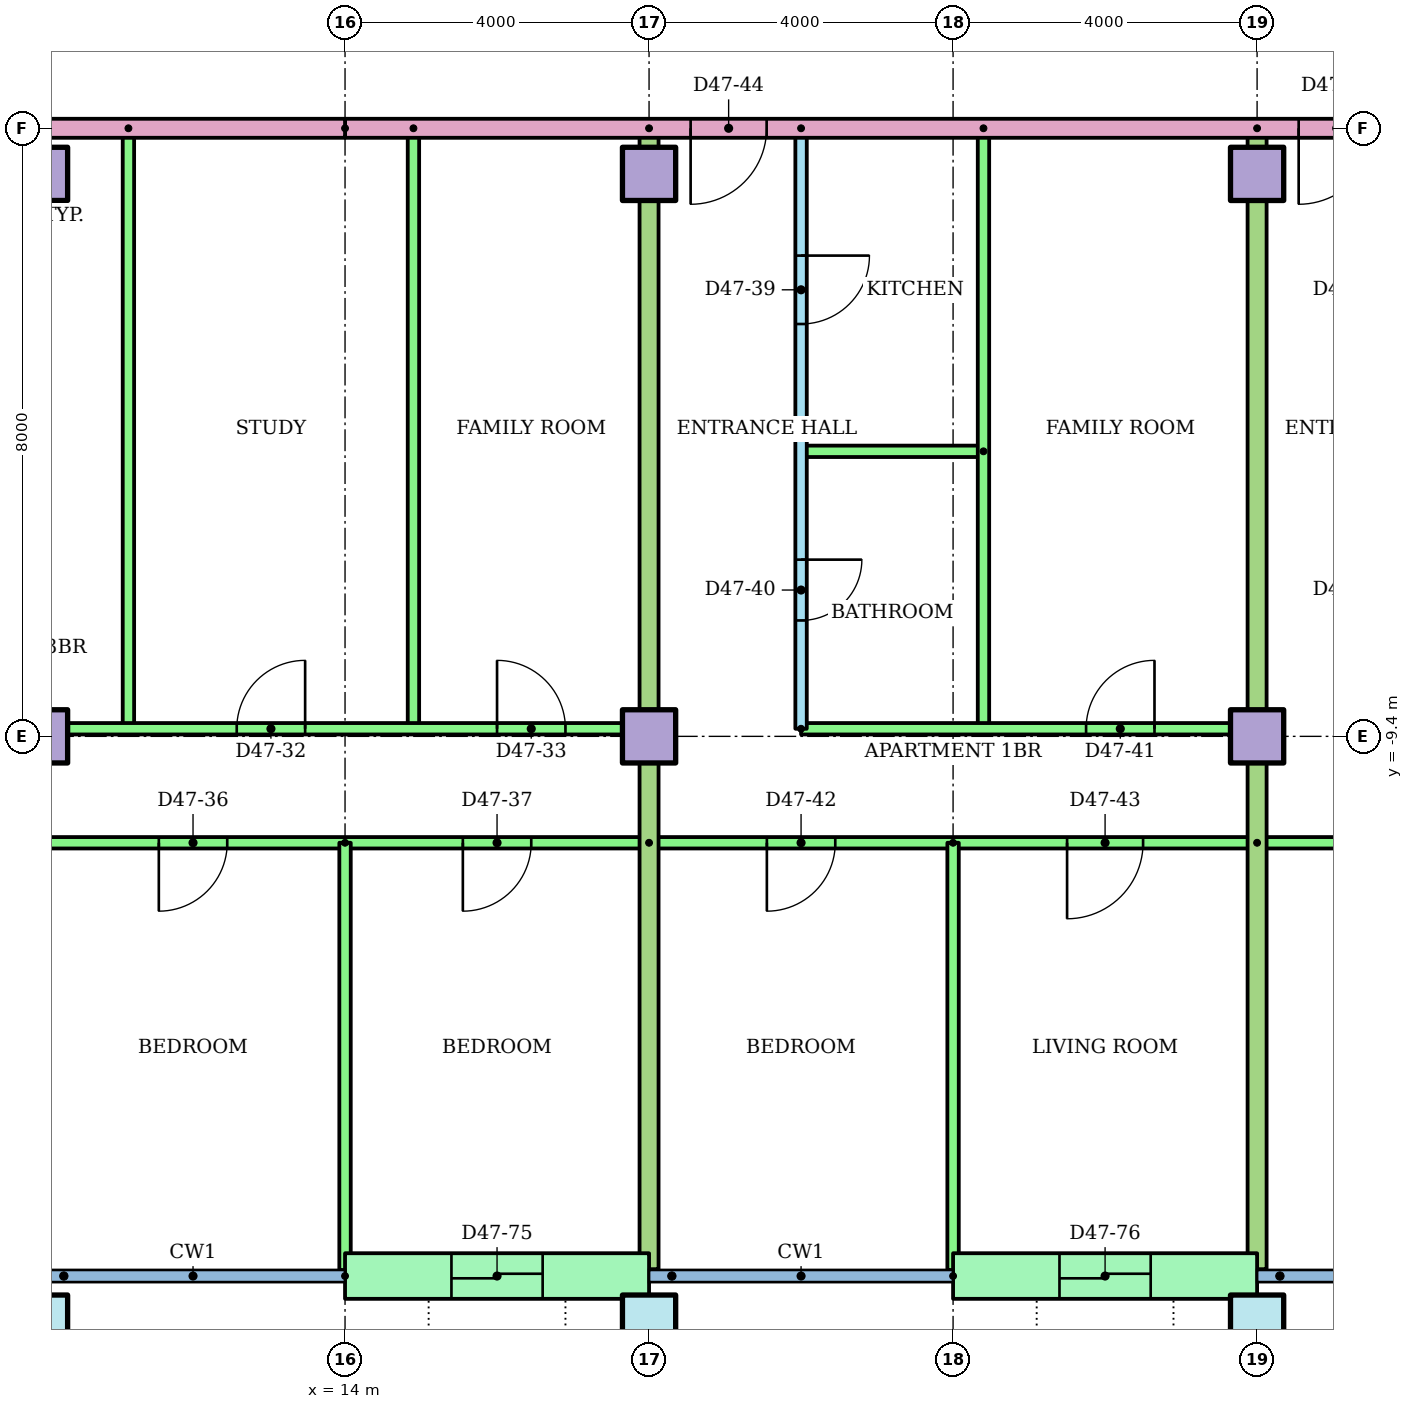
"""IFC4 building model, lengths in metres.
Left out: names, types, materials, properties, quantities, classifications, styles, units other than length and angle.
Written with IfcOpenShell. Run it as: python <this file> out.ifc"""

import sys

from ifc_helpers import new_model, si_unit, direction, frame, frame_2d, origin, origin_2d, place, context, subcontext, project, spatial, rectangle, hollow_rectangle, extrude, element, fill, save


model = new_model("IFC4")
c1 = context("Model", 3, precision=1e-05, world=origin(), true_north=direction((0.0, 1.0)))
c2 = subcontext(c1, "Body", "Model", "MODEL_VIEW")
j1 = project(units=[si_unit("LENGTHUNIT", "METRE"), si_unit("PLANEANGLEUNIT", "RADIAN")], contexts=[c1])
p1 = place(None, origin())
s1 = spatial("IfcSite", under=j1, at=p1, CompositionType="ELEMENT")
p2 = place(p1, origin())
s2 = spatial("IfcBuilding", under=s1, at=p2, CompositionType="ELEMENT")
p3 = place(p2, frame((0.0, 0.0, 181.3)))
s3 = spatial("IfcBuildingStorey", under=s2, at=p3, CompositionType="ELEMENT", Elevation=181.3)
for number, where in (
    (1, (10.0, -17.1, 0.0)),
    (2, (18.0, -17.1, 0.0)),
    (3, (26.0, -17.1, 0.0)),
):
    element("IfcColumn", number, at=place(p3, frame(where)), inside=s3, PredefinedType="COLUMN", context=c2, shape_type="SweptSolid", body=[
        extrude(hollow_rectangle(XDim=0.7, YDim=0.7, WallThickness=0.036, at=origin_2d()), origin(), (0.0, 0.0, 1.0), 3.2),
    ])
for number, where in (
    (4, (10.0, -9.4, 0.0)),
    (5, (18.0, -9.4, 0.0)),
    (6, (26.0, -9.4, 0.0)),
    (7, (10.0, -2.0, 0.0)),
    (8, (18.0, -2.0, 0.0)),
    (9, (26.0, -2.0, 0.0)),
):
    element("IfcColumn", number, at=place(p3, frame(where)), inside=s3, PredefinedType="COLUMN", context=c2, shape_type="SweptSolid", body=[
        extrude(rectangle(XDim=0.7, YDim=0.7, at=origin_2d()), origin(), (0.0, 0.0, 1.0), 3.2),
    ])
p4 = place(p3, frame((14.0, -16.5, 0.0)))
e10 = element("IfcWall", 10, at=p4, inside=s3, PredefinedType="STANDARD", context=c2, shape_type="SweptSolid", body=[
    extrude(rectangle(XDim=4.0, YDim=0.6, at=frame_2d((2.0, 0.0))), origin(), (0.0, 0.0, 1.0), 2.92),
])
p5 = place(p4, frame((1.4, 0.0, 0.0)))
e11 = element("IfcOpeningElement", 11, at=p5, cuts=e10, PredefinedType="OPENING", context=c2, shape_type="SweptSolid", body=[
    extrude(rectangle(XDim=1.2, YDim=2.1, at=frame_2d((0.6, 1.05))), frame((0.0, 0.31, 0.0), z_axis=(0.0, -1.0, 0.0), x_axis=(1.0, 0.0, 0.0)), (0.0, 0.0, 1.0), 0.62),
])
p6 = place(p3, frame((22.0, -16.5, 0.0)))
e12 = element("IfcWall", 12, at=p6, inside=s3, PredefinedType="STANDARD", context=c2, shape_type="SweptSolid", body=[
    extrude(rectangle(XDim=4.0, YDim=0.6, at=frame_2d((2.0, 0.0))), origin(), (0.0, 0.0, 1.0), 2.92),
])
p7 = place(p6, frame((1.4, 0.0, 0.0)))
e13 = element("IfcOpeningElement", 13, at=p7, cuts=e12, PredefinedType="OPENING", context=c2, shape_type="SweptSolid", body=[
    extrude(rectangle(XDim=1.2, YDim=2.1, at=frame_2d((0.6, 1.05))), frame((0.0, 0.31, 0.0), z_axis=(0.0, -1.0, 0.0), x_axis=(1.0, 0.0, 0.0)), (0.0, 0.0, 1.0), 0.62),
])
for number, where, z_axis, x_axis in (
    (14, (11.15, -1.4, 0.0), (0.0, 0.0, 1.0), (0.0, -1.0, 0.0)),
    (15, (14.9, -1.4, 0.0), (0.0, 0.0, 1.0), (0.0, -1.0, 0.0)),
):
    element("IfcWall", number, at=place(p3, frame(where, z_axis=z_axis, x_axis=x_axis)), inside=s3, PredefinedType="PARTITIONING", context=c2, shape_type="SweptSolid", body=[
        extrude(rectangle(XDim=7.9, YDim=0.15, at=frame_2d((3.95, 0.0))), origin(), (0.0, 0.0, 1.0), 2.4),
    ])
p8 = place(p3, frame((4.0, -9.3, 0.0)))
e16 = element("IfcWall", 16, at=p8, inside=s3, PredefinedType="PARTITIONING", context=c2, shape_type="SweptSolid", body=[
    extrude(rectangle(XDim=14.0, YDim=0.15, at=frame_2d((7.0, 0.0))), origin(), (0.0, 0.0, 1.0), 2.4),
])
p9 = place(p8, frame((4.325, 0.0, 0.0)))
e17 = element("IfcOpeningElement", 17, at=p9, cuts=e16, PredefinedType="OPENING", context=c2, shape_type="SweptSolid", body=[
    extrude(rectangle(XDim=0.9, YDim=2.1, at=frame_2d((0.45, 1.05))), frame((0.0, 0.085, 0.0), z_axis=(0.0, -1.0, 0.0), x_axis=(1.0, 0.0, 0.0)), (0.0, 0.0, 1.0), 0.17),
])
p10 = place(p8, frame((8.575, 0.0, 0.0)))
e18 = element("IfcOpeningElement", 18, at=p10, cuts=e16, PredefinedType="OPENING", context=c2, shape_type="SweptSolid", body=[
    extrude(rectangle(XDim=0.9, YDim=2.1, at=frame_2d((0.45, 1.05))), frame((0.0, 0.085, 0.0), z_axis=(0.0, -1.0, 0.0), x_axis=(1.0, 0.0, 0.0)), (0.0, 0.0, 1.0), 0.17),
])
p11 = place(p8, frame((12.0, 0.0, 0.0)))
e19 = element("IfcOpeningElement", 19, at=p11, cuts=e16, PredefinedType="OPENING", context=c2, shape_type="SweptSolid", body=[
    extrude(rectangle(XDim=0.9, YDim=2.1, at=frame_2d((0.45, 1.05))), frame((0.0, 0.085, 0.0), z_axis=(0.0, -1.0, 0.0), x_axis=(1.0, 0.0, 0.0)), (0.0, 0.0, 1.0), 0.17),
])
p12 = place(p3, frame((18.0, -10.8, 0.0), z_axis=(0.0, 0.0, 1.0), x_axis=(-1.0, 0.0, 0.0)))
e20 = element("IfcWall", 20, at=p12, inside=s3, PredefinedType="PARTITIONING", context=c2, shape_type="SweptSolid", body=[
    extrude(rectangle(XDim=16.0, YDim=0.15, at=frame_2d((8.0, 0.0))), origin(), (0.0, 0.0, 1.0), 2.4),
])
p13 = place(p12, frame((13.55, 0.0, 0.0)))
e21 = element("IfcOpeningElement", 21, at=p13, cuts=e20, PredefinedType="OPENING", context=c2, shape_type="SweptSolid", body=[
    extrude(rectangle(XDim=0.9, YDim=2.1, at=frame_2d((0.45, 1.05))), frame((0.0, 0.085, 0.0), z_axis=(0.0, -1.0, 0.0), x_axis=(1.0, 0.0, 0.0)), (0.0, 0.0, 1.0), 0.17),
])
p14 = place(p12, frame((9.5, 0.0, 0.0)))
e22 = element("IfcOpeningElement", 22, at=p14, cuts=e20, PredefinedType="OPENING", context=c2, shape_type="SweptSolid", body=[
    extrude(rectangle(XDim=1.0, YDim=2.1, at=frame_2d((0.5, 1.05))), frame((0.0, 0.085, 0.0), z_axis=(0.0, -1.0, 0.0), x_axis=(1.0, 0.0, 0.0)), (0.0, 0.0, 1.0), 0.17),
])
p15 = place(p12, frame((5.55, 0.0, 0.0)))
e23 = element("IfcOpeningElement", 23, at=p15, cuts=e20, PredefinedType="OPENING", context=c2, shape_type="SweptSolid", body=[
    extrude(rectangle(XDim=0.9, YDim=2.1, at=frame_2d((0.45, 1.05))), frame((0.0, 0.085, 0.0), z_axis=(0.0, -1.0, 0.0), x_axis=(1.0, 0.0, 0.0)), (0.0, 0.0, 1.0), 0.17),
])
p16 = place(p12, frame((1.55, 0.0, 0.0)))
e24 = element("IfcOpeningElement", 24, at=p16, cuts=e20, PredefinedType="OPENING", context=c2, shape_type="SweptSolid", body=[
    extrude(rectangle(XDim=0.9, YDim=2.1, at=frame_2d((0.45, 1.05))), frame((0.0, 0.085, 0.0), z_axis=(0.0, -1.0, 0.0), x_axis=(1.0, 0.0, 0.0)), (0.0, 0.0, 1.0), 0.17),
])
p17 = place(p3, frame((14.0, -10.8, 0.0), z_axis=(0.0, 0.0, 1.0), x_axis=(0.0, -1.0, 0.0)))
e25 = element("IfcWall", 25, at=p17, inside=s3, PredefinedType="PARTITIONING", context=c2, shape_type="SweptSolid", body=[
    extrude(rectangle(XDim=5.621, YDim=0.15, at=frame_2d((2.811, 0.0))), origin(), (0.0, 0.0, 1.0), 2.4),
])
p18 = place(p3, frame((20.0, -1.4, 0.0), z_axis=(0.0, 0.0, 1.0), x_axis=(0.0, -1.0, 0.0)))
e26 = element("IfcWall", 26, at=p18, inside=s3, PredefinedType="PARTITIONING", context=c2, shape_type="SweptSolid", body=[
    extrude(rectangle(XDim=7.9, YDim=0.15, at=frame_2d((3.95, 0.0))), origin(), (0.0, 0.0, 1.0), 2.4),
])
p19 = place(p18, frame((1.675, 0.0, 0.0)))
e27 = element("IfcOpeningElement", 27, at=p19, cuts=e26, PredefinedType="OPENING", context=c2, shape_type="SweptSolid", body=[
    extrude(rectangle(XDim=0.9, YDim=2.1, at=frame_2d((0.45, 1.05))), frame((0.0, 0.085, 0.0), z_axis=(0.0, -1.0, 0.0), x_axis=(1.0, 0.0, 0.0)), (0.0, 0.0, 1.0), 0.17),
])
p20 = place(p18, frame((5.675, 0.0, 0.0)))
e28 = element("IfcOpeningElement", 28, at=p20, cuts=e26, PredefinedType="OPENING", context=c2, shape_type="SweptSolid", body=[
    extrude(rectangle(XDim=0.8, YDim=2.1, at=frame_2d((0.4, 1.05))), frame((0.0, 0.085, 0.0), z_axis=(0.0, -1.0, 0.0), x_axis=(1.0, 0.0, 0.0)), (0.0, 0.0, 1.0), 0.17),
])
p21 = place(p3, frame((22.4, -5.65, 0.0), z_axis=(0.0, 0.0, 1.0), x_axis=(-1.0, 0.0, 0.0)))
e29 = element("IfcWall", 29, at=p21, inside=s3, PredefinedType="PARTITIONING", context=c2, shape_type="SweptSolid", body=[
    extrude(rectangle(XDim=2.4, YDim=0.15, at=frame_2d((1.2, 0.0))), origin(), (0.0, 0.0, 1.0), 2.4),
])
p22 = place(p3, frame((22.4, -1.4, 0.0), z_axis=(0.0, 0.0, 1.0), x_axis=(0.0, -1.0, 0.0)))
e30 = element("IfcWall", 30, at=p22, inside=s3, PredefinedType="PARTITIONING", context=c2, shape_type="SweptSolid", body=[
    extrude(rectangle(XDim=7.9, YDim=0.15, at=frame_2d((3.95, 0.0))), origin(), (0.0, 0.0, 1.0), 2.4),
])
p23 = place(p3, frame((20.0, -9.3, 0.0)))
e31 = element("IfcWall", 31, at=p23, inside=s3, PredefinedType="PARTITIONING", context=c2, shape_type="SweptSolid", body=[
    extrude(rectangle(XDim=6.0, YDim=0.15, at=frame_2d((3.0, 0.0))), origin(), (0.0, 0.0, 1.0), 2.4),
])
p24 = place(p23, frame((3.75, 0.0, 0.0)))
e32 = element("IfcOpeningElement", 32, at=p24, cuts=e31, PredefinedType="OPENING", context=c2, shape_type="SweptSolid", body=[
    extrude(rectangle(XDim=0.9, YDim=2.1, at=frame_2d((0.45, 1.05))), frame((0.0, 0.085, 0.0), z_axis=(0.0, -1.0, 0.0), x_axis=(1.0, 0.0, 0.0)), (0.0, 0.0, 1.0), 0.17),
])
p25 = place(p3, frame((26.0, -10.8, 0.0), z_axis=(0.0, 0.0, 1.0), x_axis=(-1.0, 0.0, 0.0)))
e33 = element("IfcWall", 33, at=p25, inside=s3, PredefinedType="PARTITIONING", context=c2, shape_type="SweptSolid", body=[
    extrude(rectangle(XDim=8.0, YDim=0.15, at=frame_2d((4.0, 0.0))), origin(), (0.0, 0.0, 1.0), 2.4),
])
p26 = place(p25, frame((5.55, 0.0, 0.0)))
e34 = element("IfcOpeningElement", 34, at=p26, cuts=e33, PredefinedType="OPENING", context=c2, shape_type="SweptSolid", body=[
    extrude(rectangle(XDim=0.9, YDim=2.1, at=frame_2d((0.45, 1.05))), frame((0.0, 0.085, 0.0), z_axis=(0.0, -1.0, 0.0), x_axis=(1.0, 0.0, 0.0)), (0.0, 0.0, 1.0), 0.17),
])
p27 = place(p25, frame((1.5, 0.0, 0.0)))
e35 = element("IfcOpeningElement", 35, at=p27, cuts=e33, PredefinedType="OPENING", context=c2, shape_type="SweptSolid", body=[
    extrude(rectangle(XDim=1.0, YDim=2.1, at=frame_2d((0.5, 1.05))), frame((0.0, 0.085, 0.0), z_axis=(0.0, -1.0, 0.0), x_axis=(1.0, 0.0, 0.0)), (0.0, 0.0, 1.0), 0.17),
])
p28 = place(p3, frame((22.0, -10.8, 0.0), z_axis=(0.0, 0.0, 1.0), x_axis=(0.0, -1.0, 0.0)))
e36 = element("IfcWall", 36, at=p28, inside=s3, PredefinedType="PARTITIONING", context=c2, shape_type="SweptSolid", body=[
    extrude(rectangle(XDim=5.621, YDim=0.15, at=frame_2d((2.811, 0.0))), origin(), (0.0, 0.0, 1.0), 2.4),
])
p29 = place(p3, frame((18.0, -1.4, 0.0), z_axis=(0.0, 0.0, 1.0), x_axis=(0.0, -1.0, 0.0)))
e37 = element("IfcWall", 37, at=p29, inside=s3, PredefinedType="PARTITIONING", context=c2, shape_type="SweptSolid", body=[
    extrude(rectangle(XDim=15.01, YDim=0.25, at=frame_2d((7.505, 0.0))), origin(), (0.0, 0.0, 1.0), 2.4),
])
p30 = place(p3, frame((36.82, -10.8, 0.0), z_axis=(0.0, 0.0, 1.0), x_axis=(-1.0, 0.0, 0.0)))
e38 = element("IfcWall", 38, at=p30, inside=s3, PredefinedType="PARTITIONING", context=c2, shape_type="SweptSolid", body=[
    extrude(rectangle(XDim=10.82, YDim=0.15, at=frame_2d((5.41, 0.0))), origin(), (0.0, 0.0, 1.0), 2.4),
])
p31 = place(p30, frame((7.27, 0.0, 0.0)))
e39 = element("IfcOpeningElement", 39, at=p31, cuts=e38, PredefinedType="OPENING", context=c2, shape_type="SweptSolid", body=[
    extrude(rectangle(XDim=1.0, YDim=2.1, at=frame_2d((0.5, 1.05))), frame((0.0, 0.085, 0.0), z_axis=(0.0, -1.0, 0.0), x_axis=(1.0, 0.0, 0.0)), (0.0, 0.0, 1.0), 0.17),
])
p32 = place(p30, frame((1.323, 0.0, 0.0)))
e40 = element("IfcOpeningElement", 40, at=p32, cuts=e38, PredefinedType="OPENING", context=c2, shape_type="SweptSolid", body=[
    extrude(rectangle(XDim=0.9, YDim=2.1, at=frame_2d((0.45, 1.05))), frame((0.0, 0.085, 0.0), z_axis=(0.0, -1.0, 0.0), x_axis=(1.0, 0.0, 0.0)), (0.0, 0.0, 1.0), 0.17),
])
p33 = place(p3, frame((26.0, -1.4, 0.0), z_axis=(0.0, 0.0, 1.0), x_axis=(0.0, -1.0, 0.0)))
e41 = element("IfcWall", 41, at=p33, inside=s3, PredefinedType="PARTITIONING", context=c2, shape_type="SweptSolid", body=[
    extrude(rectangle(XDim=15.01, YDim=0.25, at=frame_2d((7.505, 0.0))), origin(), (0.0, 0.0, 1.0), 2.4),
])
p34 = place(p3, frame((29.0, -1.4, 0.0), z_axis=(0.0, 0.0, 1.0), x_axis=(-1.0, 0.0, 0.0)))
e42 = element("IfcWall", 42, at=p34, inside=s3, PredefinedType="PARTITIONING", context=c2, shape_type="SweptSolid", body=[
    extrude(rectangle(XDim=15.0, YDim=0.25, at=frame_2d((7.5, 0.0))), origin(), (0.0, 0.0, 1.0), 2.4),
])
p35 = place(p34, frame((9.453, 0.0, 0.0)))
e43 = element("IfcOpeningElement", 43, at=p35, cuts=e42, PredefinedType="OPENING", context=c2, shape_type="SweptSolid", body=[
    extrude(rectangle(XDim=1.0, YDim=2.1, at=frame_2d((0.5, 1.05))), frame((0.0, 0.135, 0.0), z_axis=(0.0, -1.0, 0.0), x_axis=(1.0, 0.0, 0.0)), (0.0, 0.0, 1.0), 0.27),
])
p36 = place(p34, frame((1.453, 0.0, 0.0)))
e44 = element("IfcOpeningElement", 44, at=p36, cuts=e42, PredefinedType="OPENING", context=c2, shape_type="SweptSolid", body=[
    extrude(rectangle(XDim=1.0, YDim=2.1, at=frame_2d((0.5, 1.05))), frame((0.0, 0.135, 0.0), z_axis=(0.0, -1.0, 0.0), x_axis=(1.0, 0.0, 0.0)), (0.0, 0.0, 1.0), 0.27),
])
p37 = place(p3, frame((14.0, -1.4, 0.0), z_axis=(0.0, 0.0, 1.0), x_axis=(-1.0, 0.0, 0.0)))
e45 = element("IfcWall", 45, at=p37, inside=s3, PredefinedType="PARTITIONING", context=c2, shape_type="SweptSolid", body=[
    extrude(rectangle(XDim=28.0, YDim=0.25, at=frame_2d((14.0, 0.0))), origin(), (0.0, 0.0, 1.0), 2.4),
])
p38 = place(p37, frame((12.547, 0.0, 0.0)))
e46 = element("IfcOpeningElement", 46, at=p38, cuts=e45, PredefinedType="OPENING", context=c2, shape_type="SweptSolid", body=[
    extrude(rectangle(XDim=1.0, YDim=2.1, at=frame_2d((0.5, 1.05))), frame((0.0, 0.135, 0.0), z_axis=(0.0, -1.0, 0.0), x_axis=(1.0, 0.0, 0.0)), (0.0, 0.0, 1.0), 0.27),
])
p39 = place(p37, frame((10.453, 0.0, 0.0)))
e47 = element("IfcOpeningElement", 47, at=p39, cuts=e45, PredefinedType="OPENING", context=c2, shape_type="SweptSolid", body=[
    extrude(rectangle(XDim=1.0, YDim=2.1, at=frame_2d((0.5, 1.05))), frame((0.0, 0.135, 0.0), z_axis=(0.0, -1.0, 0.0), x_axis=(1.0, 0.0, 0.0)), (0.0, 0.0, 1.0), 0.27),
])
p40 = place(p10, origin())
e48 = element("IfcDoor", 48, at=p40, inside=s3, OperationType="SINGLE_SWING_RIGHT", PredefinedType="DOOR", context=c2, shape_type="SweptSolid", body=[
    extrude(rectangle(XDim=0.9, YDim=2.1, at=frame_2d((0.45, 1.05))), frame((0.0, 0.025, 0.0), z_axis=(0.0, -1.0, 0.0), x_axis=(1.0, 0.0, 0.0)), (0.0, 0.0, 1.0), 0.05),
])
fill(e18, e48)
p41 = place(p11, origin())
e49 = element("IfcDoor", 49, at=p41, inside=s3, OperationType="SINGLE_SWING_LEFT", PredefinedType="DOOR", context=c2, shape_type="SweptSolid", body=[
    extrude(rectangle(XDim=0.9, YDim=2.1, at=frame_2d((0.45, 1.05))), frame((0.0, 0.025, 0.0), z_axis=(0.0, -1.0, 0.0), x_axis=(1.0, 0.0, 0.0)), (0.0, 0.0, 1.0), 0.05),
])
fill(e19, e49)
p42 = place(p15, origin())
e50 = element("IfcDoor", 50, at=p42, inside=s3, OperationType="SINGLE_SWING_RIGHT", PredefinedType="DOOR", context=c2, shape_type="SweptSolid", body=[
    extrude(rectangle(XDim=0.9, YDim=2.1, at=frame_2d((0.45, 1.05))), frame((0.0, 0.025, 0.0), z_axis=(0.0, -1.0, 0.0), x_axis=(1.0, 0.0, 0.0)), (0.0, 0.0, 1.0), 0.05),
])
fill(e23, e50)
p43 = place(p16, origin())
e51 = element("IfcDoor", 51, at=p43, inside=s3, OperationType="SINGLE_SWING_RIGHT", PredefinedType="DOOR", context=c2, shape_type="SweptSolid", body=[
    extrude(rectangle(XDim=0.9, YDim=2.1, at=frame_2d((0.45, 1.05))), frame((0.0, 0.025, 0.0), z_axis=(0.0, -1.0, 0.0), x_axis=(1.0, 0.0, 0.0)), (0.0, 0.0, 1.0), 0.05),
])
fill(e24, e51)
p44 = place(p19, origin())
e52 = element("IfcDoor", 52, at=p44, inside=s3, OperationType="SINGLE_SWING_LEFT", PredefinedType="DOOR", context=c2, shape_type="SweptSolid", body=[
    extrude(rectangle(XDim=0.9, YDim=2.1, at=frame_2d((0.45, 1.05))), frame((0.0, 0.025, 0.0), z_axis=(0.0, -1.0, 0.0), x_axis=(1.0, 0.0, 0.0)), (0.0, 0.0, 1.0), 0.05),
])
fill(e27, e52)
p45 = place(p20, origin())
e53 = element("IfcDoor", 53, at=p45, inside=s3, OperationType="SINGLE_SWING_LEFT", PredefinedType="DOOR", context=c2, shape_type="SweptSolid", body=[
    extrude(rectangle(XDim=0.8, YDim=2.1, at=frame_2d((0.4, 1.05))), frame((0.0, 0.025, 0.0), z_axis=(0.0, -1.0, 0.0), x_axis=(1.0, 0.0, 0.0)), (0.0, 0.0, 1.0), 0.05),
])
fill(e28, e53)
p46 = place(p24, origin())
e54 = element("IfcDoor", 54, at=p46, inside=s3, OperationType="SINGLE_SWING_RIGHT", PredefinedType="DOOR", context=c2, shape_type="SweptSolid", body=[
    extrude(rectangle(XDim=0.9, YDim=2.1, at=frame_2d((0.45, 1.05))), frame((0.0, 0.025, 0.0), z_axis=(0.0, -1.0, 0.0), x_axis=(1.0, 0.0, 0.0)), (0.0, 0.0, 1.0), 0.05),
])
fill(e32, e54)
p47 = place(p26, origin())
e55 = element("IfcDoor", 55, at=p47, inside=s3, OperationType="SINGLE_SWING_RIGHT", PredefinedType="DOOR", context=c2, shape_type="SweptSolid", body=[
    extrude(rectangle(XDim=0.9, YDim=2.1, at=frame_2d((0.45, 1.05))), frame((0.0, 0.025, 0.0), z_axis=(0.0, -1.0, 0.0), x_axis=(1.0, 0.0, 0.0)), (0.0, 0.0, 1.0), 0.05),
])
fill(e34, e55)
p48 = place(p27, origin())
e56 = element("IfcDoor", 56, at=p48, inside=s3, OperationType="SINGLE_SWING_RIGHT", PredefinedType="DOOR", context=c2, shape_type="SweptSolid", body=[
    extrude(rectangle(XDim=1.0, YDim=2.1, at=frame_2d((0.5, 1.05))), frame((0.0, 0.025, 0.0), z_axis=(0.0, -1.0, 0.0), x_axis=(1.0, 0.0, 0.0)), (0.0, 0.0, 1.0), 0.05),
])
fill(e35, e56)
p49 = place(p35, origin())
e57 = element("IfcDoor", 57, at=p49, inside=s3, OperationType="SINGLE_SWING_RIGHT", PredefinedType="DOOR", context=c2, shape_type="SweptSolid", body=[
    extrude(rectangle(XDim=1.0, YDim=2.1, at=frame_2d((0.5, 1.05))), frame((0.0, 0.025, 0.0), z_axis=(0.0, -1.0, 0.0), x_axis=(1.0, 0.0, 0.0)), (0.0, 0.0, 1.0), 0.05),
])
fill(e43, e57)
p50 = place(p36, origin())
e58 = element("IfcDoor", 58, at=p50, inside=s3, OperationType="SINGLE_SWING_RIGHT", PredefinedType="DOOR", context=c2, shape_type="SweptSolid", body=[
    extrude(rectangle(XDim=1.0, YDim=2.1, at=frame_2d((0.5, 1.05))), frame((0.0, 0.025, 0.0), z_axis=(0.0, -1.0, 0.0), x_axis=(1.0, 0.0, 0.0)), (0.0, 0.0, 1.0), 0.05),
])
fill(e44, e58)
p51 = place(p5, origin())
e59 = element("IfcDoor", 59, at=p51, inside=s3, OperationType="SLIDING_TO_LEFT", PredefinedType="DOOR", context=c2, shape_type="SweptSolid", body=[
    extrude(rectangle(XDim=1.2, YDim=2.1, at=frame_2d((0.6, 1.05))), frame((0.0, 0.025, 0.0), z_axis=(0.0, -1.0, 0.0), x_axis=(1.0, 0.0, 0.0)), (0.0, 0.0, 1.0), 0.05),
])
fill(e11, e59)
p52 = place(p7, origin())
e60 = element("IfcDoor", 60, at=p52, inside=s3, OperationType="SLIDING_TO_LEFT", PredefinedType="DOOR", context=c2, shape_type="SweptSolid", body=[
    extrude(rectangle(XDim=1.2, YDim=2.1, at=frame_2d((0.6, 1.05))), frame((0.0, 0.025, 0.0), z_axis=(0.0, -1.0, 0.0), x_axis=(1.0, 0.0, 0.0)), (0.0, 0.0, 1.0), 0.05),
])
fill(e13, e60)
save(model, sys.argv[1])
